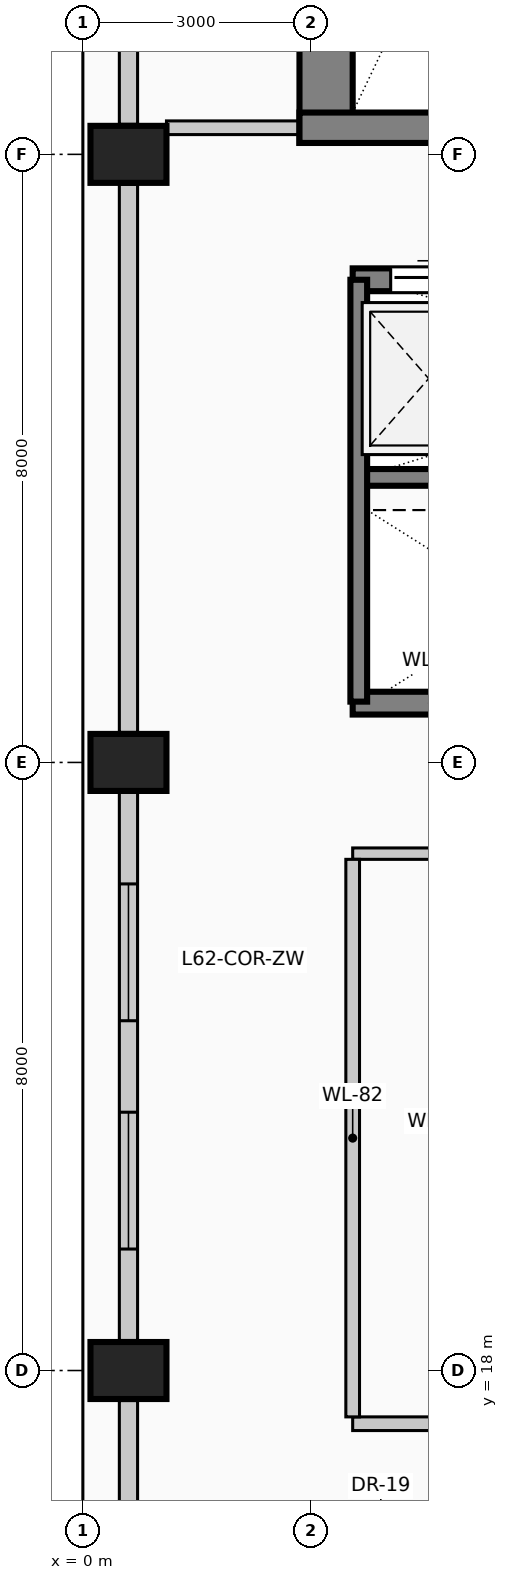
"""IFC4 building model, lengths in metres.
Left out: names, types, materials, properties, quantities, classifications, styles, units other than length and angle.
Written with IfcOpenShell. Run it as: python <this file> out.ifc"""

import sys

from ifc_helpers import new_model, si_unit, direction, frame, frame_2d, origin, origin_2d, place, context, subcontext, project, spatial, rectangle, extrude, element, fill, save


model = new_model("IFC4")
c1 = context("Model", 3, precision=1e-05, world=origin(), true_north=direction((0.0, 1.0)))
c2 = subcontext(c1, "Body", "Model", "MODEL_VIEW")
j1 = project(units=[si_unit("LENGTHUNIT", "METRE"), si_unit("PLANEANGLEUNIT", "RADIAN")], contexts=[c1])
p1 = place(None, origin())
s1 = spatial("IfcSite", under=j1, at=p1, CompositionType="ELEMENT")
p2 = place(p1, origin())
s2 = spatial("IfcBuilding", under=s1, at=p2, CompositionType="ELEMENT")
p3 = place(p2, frame((0.0, 0.0, 256.6)))
s3 = spatial("IfcBuildingStorey", under=s2, at=p3, CompositionType="ELEMENT", Elevation=256.6)
p4 = place(p3, frame((3.2, 34.15, 0.0), z_axis=(0.0, 0.0, 1.0), x_axis=(0.0, 1.0, 0.0)))
e1 = element("IfcWall", 1, at=p4, inside=s3, PredefinedType="SHEAR", context=c2, shape_type="SweptSolid", body=[
    extrude(rectangle(XDim=8.98, YDim=0.7, at=frame_2d((4.49, 0.0))), origin(), (0.0, 0.0, 1.0), 4.0),
])
p5 = place(p3, frame((2.85, 34.35, 0.0), z_axis=(0.0, 0.0, 1.0), x_axis=(1.0, 0.0, 0.0)))
e2 = element("IfcWall", 2, at=p5, inside=s3, PredefinedType="SHEAR", context=c2, shape_type="SweptSolid", body=[
    extrude(rectangle(XDim=4.86, YDim=0.4, at=frame_2d((2.43, 0.0))), origin(), (0.0, 0.0, 1.0), 4.0),
])
p6 = place(p5, frame((2.4, 0.0, 0.0)))
e3 = element("IfcOpeningElement", 3, at=p6, cuts=e2, PredefinedType="OPENING", context=c2, shape_type="SweptSolid", body=[
    extrude(rectangle(XDim=1.15, YDim=2.2, at=frame_2d((0.575, 1.1))), frame((0.0, 0.21, 0.0), z_axis=(0.0, -1.0, 0.0), x_axis=(1.0, 0.0, 0.0)), (0.0, 0.0, 1.0), 0.42),
])
for number, where, z_axis, x_axis in (
    (4, (0.6, 18.0, 0.0), (0.0, 0.0, 1.0), (0.0, 1.0, 0.0)),
    (5, (0.6, 26.0, 0.0), (0.0, 0.0, 1.0), (0.0, 1.0, 0.0)),
    (6, (0.6, 34.0, 0.0), (0.0, 0.0, 1.0), (0.0, 1.0, 0.0)),
):
    element("IfcColumn", number, at=place(p3, frame(where, z_axis=z_axis, x_axis=x_axis)), inside=s3, PredefinedType="COLUMN", context=c2, shape_type="SweptSolid", body=[
        extrude(rectangle(XDim=0.75, YDim=1.0, at=origin_2d()), origin(), (0.0, 0.0, 1.0), 4.0),
    ])
p7 = place(p3, frame((0.6, 10.395, 0.0), z_axis=(0.0, 0.0, 1.0), x_axis=(0.0, 1.0, 0.0)))
e7 = element("IfcWall", 7, at=p7, inside=s3, PredefinedType="SOLIDWALL", context=c2, shape_type="SweptSolid", body=[
    extrude(rectangle(XDim=7.21, YDim=0.24, at=frame_2d((3.605, 0.0))), origin(), (0.0, 0.0, 1.0), 3.0),
])
p8 = place(p7, frame((1.203, 0.0, 0.42)))
e8 = element("IfcOpeningElement", 8, at=p8, cuts=e7, PredefinedType="OPENING", context=c2, shape_type="SweptSolid", body=[
    extrude(rectangle(XDim=1.8, YDim=2.2, at=frame_2d((0.9, 1.1))), frame((0.0, 0.13, 0.0), z_axis=(0.0, -1.0, 0.0), x_axis=(1.0, 0.0, 0.0)), (0.0, 0.0, 1.0), 0.26),
])
p9 = place(p3, frame((0.6, 18.395, 0.0), z_axis=(0.0, 0.0, 1.0), x_axis=(0.0, 1.0, 0.0)))
e9 = element("IfcWall", 9, at=p9, inside=s3, PredefinedType="SOLIDWALL", context=c2, shape_type="SweptSolid", body=[
    extrude(rectangle(XDim=7.21, YDim=0.24, at=frame_2d((3.605, 0.0))), origin(), (0.0, 0.0, 1.0), 3.0),
])
p10 = place(p9, frame((1.203, 0.0, 0.42)))
e10 = element("IfcOpeningElement", 10, at=p10, cuts=e9, PredefinedType="OPENING", context=c2, shape_type="SweptSolid", body=[
    extrude(rectangle(XDim=1.8, YDim=2.2, at=frame_2d((0.9, 1.1))), frame((0.0, 0.13, 0.0), z_axis=(0.0, -1.0, 0.0), x_axis=(1.0, 0.0, 0.0)), (0.0, 0.0, 1.0), 0.26),
])
p11 = place(p9, frame((4.207, 0.0, 0.42)))
e11 = element("IfcOpeningElement", 11, at=p11, cuts=e9, PredefinedType="OPENING", context=c2, shape_type="SweptSolid", body=[
    extrude(rectangle(XDim=1.8, YDim=2.2, at=frame_2d((0.9, 1.1))), frame((0.0, 0.13, 0.0), z_axis=(0.0, -1.0, 0.0), x_axis=(1.0, 0.0, 0.0)), (0.0, 0.0, 1.0), 0.26),
])
p12 = place(p3, frame((0.6, 26.395, 0.0), z_axis=(0.0, 0.0, 1.0), x_axis=(0.0, 1.0, 0.0)))
e12 = element("IfcWall", 12, at=p12, inside=s3, PredefinedType="SOLIDWALL", context=c2, shape_type="SweptSolid", body=[
    extrude(rectangle(XDim=7.21, YDim=0.24, at=frame_2d((3.605, 0.0))), origin(), (0.0, 0.0, 1.0), 3.0),
])
p13 = place(p3, frame((0.6, 34.395, 0.0), z_axis=(0.0, 0.0, 1.0), x_axis=(0.0, 1.0, 0.0)))
e13 = element("IfcWall", 13, at=p13, inside=s3, PredefinedType="SOLIDWALL", context=c2, shape_type="SweptSolid", body=[
    extrude(rectangle(XDim=7.61, YDim=0.24, at=frame_2d((3.805, 0.0))), origin(), (0.0, 0.0, 1.0), 3.0),
])
p14 = place(p3, frame((3.55, 32.35, 0.0), z_axis=(0.0, 0.0, 1.0), x_axis=(1.0, 0.0, 0.0)))
e14 = element("IfcWall", 14, at=p14, inside=s3, PredefinedType="SOLIDWALL", context=c2, shape_type="SweptSolid", body=[
    extrude(rectangle(XDim=2.1, YDim=0.3, at=frame_2d((1.05, 0.0))), origin(), (0.0, 0.0, 1.0), 4.0),
])
p15 = place(p14, frame((0.5, 0.0, 0.0)))
e15 = element("IfcOpeningElement", 15, at=p15, cuts=e14, PredefinedType="OPENING", context=c2, shape_type="SweptSolid", body=[
    extrude(rectangle(XDim=1.1, YDim=2.2, at=frame_2d((0.55, 1.1))), frame((0.0, 0.16, 0.0), z_axis=(0.0, -1.0, 0.0), x_axis=(1.0, 0.0, 0.0)), (0.0, 0.0, 1.0), 0.32),
])
p16 = place(p3, frame((5.65, 26.78, 0.0), z_axis=(0.0, 0.0, 1.0), x_axis=(-1.0, 0.0, 0.0)))
e16 = element("IfcWall", 16, at=p16, inside=s3, PredefinedType="SOLIDWALL", context=c2, shape_type="SweptSolid", body=[
    extrude(rectangle(XDim=2.1, YDim=0.3, at=frame_2d((1.05, 0.0))), origin(), (0.0, 0.0, 1.0), 4.0),
])
p17 = place(p3, frame((3.55, 29.75, 0.0), z_axis=(0.0, 0.0, 1.0), x_axis=(1.0, 0.0, 0.0)))
e17 = element("IfcWall", 17, at=p17, inside=s3, PredefinedType="SOLIDWALL", context=c2, shape_type="SweptSolid", body=[
    extrude(rectangle(XDim=8.65, YDim=0.22, at=frame_2d((4.325, 0.0))), origin(), (0.0, 0.0, 1.0), 4.0),
])
p18 = place(p3, frame((3.63, 26.8, 0.0), z_axis=(0.0, 0.0, 1.0), x_axis=(0.0, 1.0, 0.0)))
e18 = element("IfcWall", 18, at=p18, inside=s3, PredefinedType="SOLIDWALL", context=c2, shape_type="SweptSolid", body=[
    extrude(rectangle(XDim=5.55, YDim=0.22, at=frame_2d((2.775, 0.0))), origin(), (0.0, 0.0, 1.0), 4.0),
])
p19 = place(p3, frame((3.55, 17.3, 0.0), z_axis=(0.0, 0.0, 1.0), x_axis=(1.0, 0.0, 0.0)))
e19 = element("IfcWall", 19, at=p19, inside=s3, PredefinedType="PARTITIONING", context=c2, shape_type="SweptSolid", body=[
    extrude(rectangle(XDim=6.25, YDim=0.18, at=frame_2d((3.125, 0.0))), origin(), (0.0, 0.0, 1.0), 3.75),
])
p20 = place(p19, frame((2.65, 0.0, 0.0)))
e20 = element("IfcOpeningElement", 20, at=p20, cuts=e19, PredefinedType="OPENING", context=c2, shape_type="SweptSolid", body=[
    extrude(rectangle(XDim=0.95, YDim=2.15, at=frame_2d((0.475, 1.075))), frame((0.0, 0.1, 0.0), z_axis=(0.0, -1.0, 0.0), x_axis=(1.0, 0.0, 0.0)), (0.0, 0.0, 1.0), 0.2),
])
p21 = place(p3, frame((3.55, 24.8, 0.0), z_axis=(0.0, 0.0, 1.0), x_axis=(1.0, 0.0, 0.0)))
e21 = element("IfcWall", 21, at=p21, inside=s3, PredefinedType="PARTITIONING", context=c2, shape_type="SweptSolid", body=[
    extrude(rectangle(XDim=6.25, YDim=0.15, at=frame_2d((3.125, 0.0))), origin(), (0.0, 0.0, 1.0), 3.75),
])
p22 = place(p3, frame((1.1, 34.35, 0.0), z_axis=(0.0, 0.0, 1.0), x_axis=(1.0, 0.0, 0.0)))
e22 = element("IfcWall", 22, at=p22, inside=s3, PredefinedType="PARTITIONING", context=c2, shape_type="SweptSolid", body=[
    extrude(rectangle(XDim=1.75, YDim=0.18, at=frame_2d((0.875, 0.0))), origin(), (0.0, 0.0, 1.0), 3.75),
])
p23 = place(p3, frame((3.55, 17.39, 0.0), z_axis=(0.0, 0.0, 1.0), x_axis=(0.0, 1.0, 0.0)))
e23 = element("IfcWall", 23, at=p23, inside=s3, PredefinedType="PARTITIONING", context=c2, shape_type="SweptSolid", body=[
    extrude(rectangle(XDim=7.335, YDim=0.18, at=frame_2d((3.667, 0.0))), origin(), (0.0, 0.0, 1.0), 3.75),
])
p24 = place(p10, origin())
e24 = element("IfcWindow", 24, at=p24, inside=s3, PartitioningType="SINGLE_PANEL", PredefinedType="WINDOW", context=c2, shape_type="SweptSolid", body=[
    extrude(rectangle(XDim=1.8, YDim=2.2, at=frame_2d((0.9, 1.1))), frame((0.0, 0.03, 0.0), z_axis=(0.0, -1.0, 0.0), x_axis=(1.0, 0.0, 0.0)), (0.0, 0.0, 1.0), 0.06),
])
fill(e10, e24)
p25 = place(p11, origin())
e25 = element("IfcWindow", 25, at=p25, inside=s3, PartitioningType="SINGLE_PANEL", PredefinedType="WINDOW", context=c2, shape_type="SweptSolid", body=[
    extrude(rectangle(XDim=1.8, YDim=2.2, at=frame_2d((0.9, 1.1))), frame((0.0, 0.03, 0.0), z_axis=(0.0, -1.0, 0.0), x_axis=(1.0, 0.0, 0.0)), (0.0, 0.0, 1.0), 0.06),
])
fill(e11, e25)
p26 = place(p15, origin())
e26 = element("IfcDoor", 26, at=p26, inside=s3, OperationType="SLIDING_TO_LEFT", PredefinedType="DOOR", context=c2, shape_type="SweptSolid", body=[
    extrude(rectangle(XDim=1.1, YDim=2.2, at=frame_2d((0.55, 1.1))), frame((0.0, 0.025, 0.0), z_axis=(0.0, -1.0, 0.0), x_axis=(1.0, 0.0, 0.0)), (0.0, 0.0, 1.0), 0.05),
])
fill(e15, e26)
save(model, sys.argv[1])
